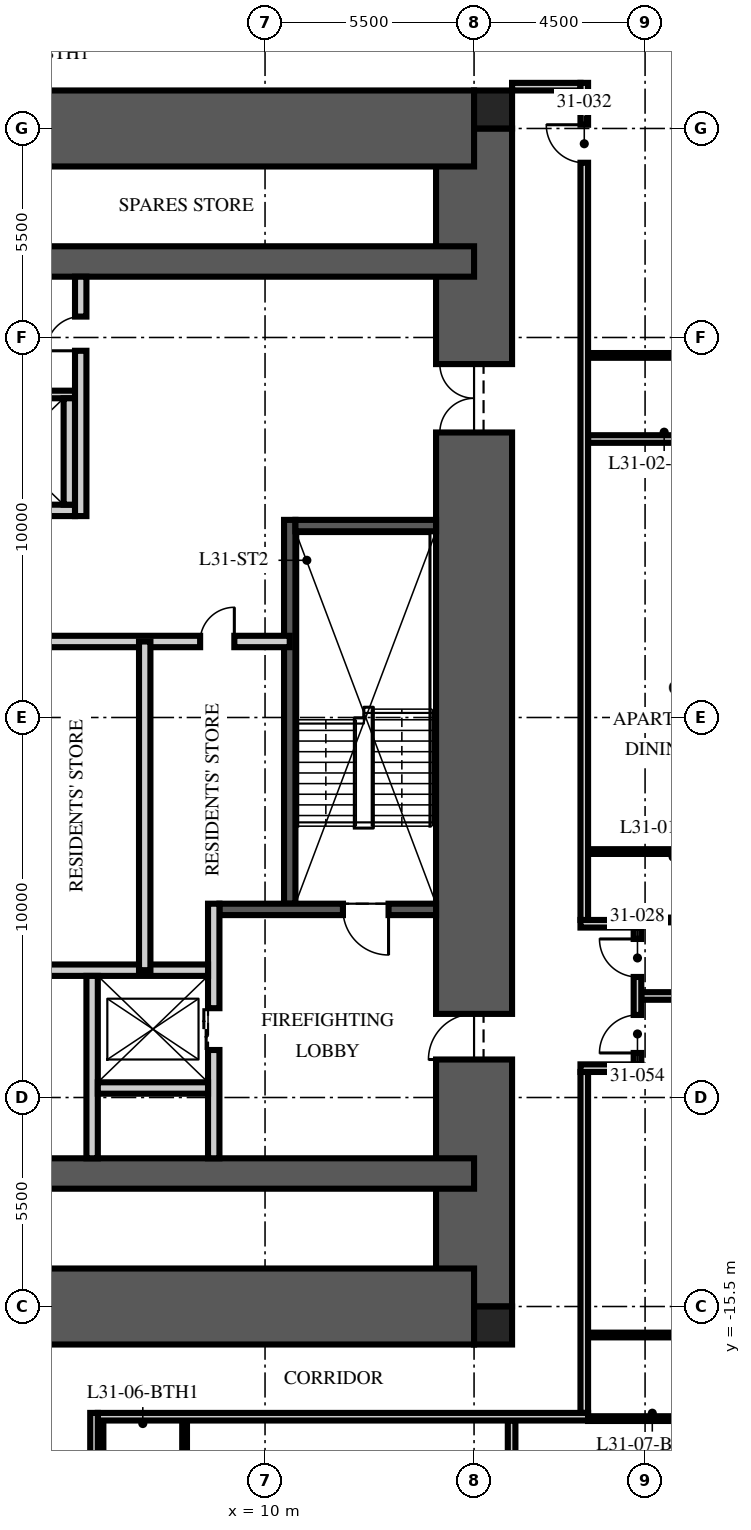
"""IFC4 building model, lengths in metres.
Left out: names, types, materials, properties, quantities, classifications, styles, units other than length and angle.
Written with IfcOpenShell. Run it as: python <this file> out.ifc"""

import sys

from ifc_helpers import new_model, si_unit, direction, frame, frame_2d, origin, origin_2d, place, context, subcontext, project, spatial, rectangle, extrude, element, fill, save


model = new_model("IFC4")
c1 = context("Model", 3, precision=1e-05, world=origin(), true_north=direction((0.0, 1.0)))
c2 = subcontext(c1, "Body", "Model", "MODEL_VIEW")
j1 = project(units=[si_unit("LENGTHUNIT", "METRE"), si_unit("PLANEANGLEUNIT", "RADIAN")], contexts=[c1])
p1 = place(None, origin())
s1 = spatial("IfcSite", under=j1, at=p1, CompositionType="ELEMENT")
p2 = place(p1, origin())
s2 = spatial("IfcBuilding", under=s1, at=p2, CompositionType="ELEMENT")
p3 = place(p2, frame((0.0, 0.0, 126.0)))
s3 = spatial("IfcBuildingStorey", under=s2, at=p3, CompositionType="ELEMENT", Elevation=126.0)
p4 = place(p3, frame((15.5, -15.5, -0.25), z_axis=(0.0, 0.0, 1.0), x_axis=(0.0, 1.0, 0.0)))
e1 = element("IfcWall", 1, at=p4, inside=s3, PredefinedType="SHEAR", context=c2, shape_type="SweptSolid", body=[
    extrude(rectangle(XDim=31.0, YDim=2.0, at=frame_2d((15.5, 0.0))), origin(), (0.0, 0.0, 1.0), 3.75),
])
p5 = place(p4, frame((6.5, 0.0, 0.25)))
e2 = element("IfcOpeningElement", 2, at=p5, cuts=e1, PredefinedType="OPENING", context=c2, shape_type="SweptSolid", body=[
    extrude(rectangle(XDim=1.2, YDim=2.1, at=frame_2d((0.6, 1.05))), frame((0.0, 1.01, 0.0), z_axis=(0.0, -1.0, 0.0), x_axis=(1.0, 0.0, 0.0)), (0.0, 0.0, 1.0), 2.02),
])
p6 = place(p4, frame((23.0, 0.0, 0.25)))
e3 = element("IfcOpeningElement", 3, at=p6, cuts=e1, PredefinedType="OPENING", context=c2, shape_type="SweptSolid", body=[
    extrude(rectangle(XDim=1.8, YDim=2.1, at=frame_2d((0.9, 1.05))), frame((0.0, 1.01, 0.0), z_axis=(0.0, -1.0, 0.0), x_axis=(1.0, 0.0, 0.0)), (0.0, 0.0, 1.0), 2.02),
])
p7 = place(p3, frame((-15.5, 15.5, -0.25), z_axis=(0.0, 0.0, 1.0), x_axis=(1.0, 0.0, 0.0)))
e4 = element("IfcWall", 4, at=p7, inside=s3, PredefinedType="SHEAR", context=c2, shape_type="SweptSolid", body=[
    extrude(rectangle(XDim=31.0, YDim=2.0, at=frame_2d((15.5, 0.0))), origin(), (0.0, 0.0, 1.0), 3.75),
])
p8 = place(p7, frame((5.0, 0.0, 0.25)))
e5 = element("IfcOpeningElement", 5, at=p8, cuts=e4, PredefinedType="OPENING", context=c2, shape_type="SweptSolid", body=[
    extrude(rectangle(XDim=1.0, YDim=2.1, at=frame_2d((0.5, 1.05))), frame((0.0, 1.01, 0.0), z_axis=(0.0, -1.0, 0.0), x_axis=(1.0, 0.0, 0.0)), (0.0, 0.0, 1.0), 2.02),
])
p9 = place(p3, frame((-15.5, -15.5, -0.25), z_axis=(0.0, 0.0, 1.0), x_axis=(1.0, 0.0, 0.0)))
e6 = element("IfcWall", 6, at=p9, inside=s3, PredefinedType="SHEAR", context=c2, shape_type="SweptSolid", body=[
    extrude(rectangle(XDim=31.0, YDim=2.0, at=frame_2d((15.5, 0.0))), origin(), (0.0, 0.0, 1.0), 3.75),
])
p10 = place(p9, frame((10.4, 0.0, 0.25)))
e7 = element("IfcOpeningElement", 7, at=p10, cuts=e6, PredefinedType="OPENING", context=c2, shape_type="SweptSolid", body=[
    extrude(rectangle(XDim=1.1, YDim=2.1, at=frame_2d((0.55, 1.05))), frame((0.0, 1.01, 0.0), z_axis=(0.0, -1.0, 0.0), x_axis=(1.0, 0.0, 0.0)), (0.0, 0.0, 1.0), 2.02),
])
p11 = place(p9, frame((13.5, 0.0, 0.25)))
e8 = element("IfcOpeningElement", 8, at=p11, cuts=e6, PredefinedType="OPENING", context=c2, shape_type="SweptSolid", body=[
    extrude(rectangle(XDim=1.1, YDim=2.1, at=frame_2d((0.55, 1.05))), frame((0.0, 1.01, 0.0), z_axis=(0.0, -1.0, 0.0), x_axis=(1.0, 0.0, 0.0)), (0.0, 0.0, 1.0), 2.02),
])
p12 = place(p9, frame((16.6, 0.0, 0.25)))
e9 = element("IfcOpeningElement", 9, at=p12, cuts=e6, PredefinedType="OPENING", context=c2, shape_type="SweptSolid", body=[
    extrude(rectangle(XDim=1.1, YDim=2.1, at=frame_2d((0.55, 1.05))), frame((0.0, 1.01, 0.0), z_axis=(0.0, -1.0, 0.0), x_axis=(1.0, 0.0, 0.0)), (0.0, 0.0, 1.0), 2.02),
])
for number, where, z_axis, x_axis in (
    (10, (-15.5, 12.0, -0.25), (0.0, 0.0, 1.0), (1.0, 0.0, 0.0)),
    (11, (-15.5, -12.0, -0.25), (0.0, 0.0, 1.0), (1.0, 0.0, 0.0)),
):
    element("IfcWall", number, at=place(p3, frame(where, z_axis=z_axis, x_axis=x_axis)), inside=s3, PredefinedType="SHEAR", context=c2, shape_type="SweptSolid", body=[
        extrude(rectangle(XDim=31.0, YDim=0.8, at=frame_2d((15.5, 0.0))), origin(), (0.0, 0.0, 1.0), 3.75),
    ])
for number, where, z_axis, x_axis in (
    (12, (16.0, 16.0, -0.25), (0.0, 0.0, 1.0), (1.0, 0.0, 0.0)),
    (13, (16.0, -16.0, -0.25), (0.0, 0.0, 1.0), (1.0, 0.0, 0.0)),
):
    element("IfcColumn", number, at=place(p3, frame(where, z_axis=z_axis, x_axis=x_axis)), inside=s3, PredefinedType="COLUMN", context=c2, shape_type="SweptSolid", body=[
        extrude(rectangle(XDim=1.0, YDim=1.0, at=origin_2d()), origin(), (0.0, 0.0, 1.0), 3.75),
    ])
p13 = place(p3, frame((10.65, -4.9, 0.0), z_axis=(0.0, 0.0, 1.0), x_axis=(0.0, 1.0, 0.0)))
e14 = element("IfcWall", 14, at=p13, inside=s3, PredefinedType="SOLIDWALL", context=c2, shape_type="SweptSolid", body=[
    extrude(rectangle(XDim=10.1, YDim=0.3, at=frame_2d((5.05, 0.0))), origin(), (0.0, 0.0, 1.0), 3.5),
])
p14 = place(p3, frame((14.5, -5.05, 0.0), z_axis=(0.0, 0.0, 1.0), x_axis=(-1.0, 0.0, 0.0)))
e15 = element("IfcWall", 15, at=p14, inside=s3, PredefinedType="SOLIDWALL", context=c2, shape_type="SweptSolid", body=[
    extrude(rectangle(XDim=5.7, YDim=0.3, at=frame_2d((2.85, 0.0))), origin(), (0.0, 0.0, 1.0), 3.5),
])
p15 = place(p14, frame((1.25, 0.0, 0.0)))
e16 = element("IfcOpeningElement", 16, at=p15, cuts=e15, PredefinedType="OPENING", context=c2, shape_type="SweptSolid", body=[
    extrude(rectangle(XDim=1.2, YDim=2.1, at=frame_2d((0.6, 1.05))), frame((0.0, 0.16, 0.0), z_axis=(0.0, -1.0, 0.0), x_axis=(1.0, 0.0, 0.0)), (0.0, 0.0, 1.0), 0.32),
])
p16 = place(p3, frame((14.5, 5.05, 0.0), z_axis=(0.0, 0.0, 1.0), x_axis=(-1.0, 0.0, 0.0)))
e17 = element("IfcWall", 17, at=p16, inside=s3, PredefinedType="SOLIDWALL", context=c2, shape_type="SweptSolid", body=[
    extrude(rectangle(XDim=3.7, YDim=0.3, at=frame_2d((1.85, 0.0))), origin(), (0.0, 0.0, 1.0), 3.5),
])
p17 = place(p3, frame((8.65, -11.6, 0.0), z_axis=(0.0, 0.0, 1.0), x_axis=(0.0, 1.0, 0.0)))
e18 = element("IfcWall", 18, at=p17, inside=s3, PredefinedType="PARTITIONING", context=c2, shape_type="SweptSolid", body=[
    extrude(rectangle(XDim=6.7, YDim=0.3, at=frame_2d((3.35, 0.0))), origin(), (0.0, 0.0, 1.0), 3.5),
])
p18 = place(p17, frame((2.85, 0.0, 0.0)))
e19 = element("IfcOpeningElement", 19, at=p18, cuts=e18, PredefinedType="OPENING", context=c2, shape_type="SweptSolid", body=[
    extrude(rectangle(XDim=1.1, YDim=2.1, at=frame_2d((0.55, 1.05))), frame((0.0, 0.16, 0.0), z_axis=(0.0, -1.0, 0.0), x_axis=(1.0, 0.0, 0.0)), (0.0, 0.0, 1.0), 0.32),
])
p19 = place(p3, frame((-8.5, -6.65, 0.0), z_axis=(0.0, 0.0, 1.0), x_axis=(1.0, 0.0, 0.0)))
e20 = element("IfcWall", 20, at=p19, inside=s3, PredefinedType="PARTITIONING", context=c2, shape_type="SweptSolid", body=[
    extrude(rectangle(XDim=17.0, YDim=0.3, at=frame_2d((8.5, 0.0))), origin(), (0.0, 0.0, 1.0), 3.5),
])
p20 = place(p19, frame((7.8, 0.0, 0.0)))
e21 = element("IfcOpeningElement", 21, at=p20, cuts=e20, PredefinedType="OPENING", context=c2, shape_type="SweptSolid", body=[
    extrude(rectangle(XDim=1.3, YDim=2.4, at=frame_2d((0.65, 1.2))), frame((0.0, 0.16, 0.0), z_axis=(0.0, -1.0, 0.0), x_axis=(1.0, 0.0, 0.0)), (0.0, 0.0, 1.0), 0.32),
])
p21 = place(p19, frame((5.65, 0.0, 0.0)))
e22 = element("IfcOpeningElement", 22, at=p21, cuts=e20, PredefinedType="OPENING", context=c2, shape_type="SweptSolid", body=[
    extrude(rectangle(XDim=0.9, YDim=2.1, at=frame_2d((0.45, 1.05))), frame((0.0, 0.16, 0.0), z_axis=(0.0, -1.0, 0.0), x_axis=(1.0, 0.0, 0.0)), (0.0, 0.0, 1.0), 0.32),
])
p22 = place(p19, frame((10.4, 0.0, 0.0)))
e23 = element("IfcOpeningElement", 23, at=p22, cuts=e20, PredefinedType="OPENING", context=c2, shape_type="SweptSolid", body=[
    extrude(rectangle(XDim=0.9, YDim=2.1, at=frame_2d((0.45, 1.05))), frame((0.0, 0.16, 0.0), z_axis=(0.0, -1.0, 0.0), x_axis=(1.0, 0.0, 0.0)), (0.0, 0.0, 1.0), 0.32),
])
p23 = place(p3, frame((5.45, -11.6, 0.0), z_axis=(0.0, 0.0, 1.0), x_axis=(0.0, 1.0, 0.0)))
e24 = element("IfcWall", 24, at=p23, inside=s3, PredefinedType="PARTITIONING", context=c2, shape_type="SweptSolid", body=[
    extrude(rectangle(XDim=4.8, YDim=0.3, at=frame_2d((2.4, 0.0))), origin(), (0.0, 0.0, 1.0), 3.5),
])
p24 = place(p3, frame((5.6, -9.75, 0.0), z_axis=(0.0, 0.0, 1.0), x_axis=(1.0, 0.0, 0.0)))
e25 = element("IfcWall", 25, at=p24, inside=s3, PredefinedType="PARTITIONING", context=c2, shape_type="SweptSolid", body=[
    extrude(rectangle(XDim=2.9, YDim=0.3, at=frame_2d((1.45, 0.0))), origin(), (0.0, 0.0, 1.0), 3.5),
])
p25 = place(p3, frame((-4.7, 5.45, 0.0), z_axis=(0.0, 0.0, 1.0), x_axis=(1.0, 0.0, 0.0)))
e26 = element("IfcWall", 26, at=p25, inside=s3, PredefinedType="PARTITIONING", context=c2, shape_type="SweptSolid", body=[
    extrude(rectangle(XDim=9.7, YDim=0.3, at=frame_2d((4.85, 0.0))), origin(), (0.0, 0.0, 1.0), 3.5),
])
p26 = place(p3, frame((-4.7, 8.5, 0.0), z_axis=(0.0, 0.0, 1.0), x_axis=(1.0, 0.0, 0.0)))
e27 = element("IfcWall", 27, at=p26, inside=s3, PredefinedType="PARTITIONING", context=c2, shape_type="SweptSolid", body=[
    extrude(rectangle(XDim=9.7, YDim=0.2, at=frame_2d((4.85, 0.0))), origin(), (0.0, 0.0, 1.0), 3.5),
])
p27 = place(p3, frame((4.85, 5.6, 0.0), z_axis=(0.0, 0.0, 1.0), x_axis=(0.0, 1.0, 0.0)))
e28 = element("IfcWall", 28, at=p27, inside=s3, PredefinedType="PARTITIONING", context=c2, shape_type="SweptSolid", body=[
    extrude(rectangle(XDim=2.8, YDim=0.3, at=frame_2d((1.4, 0.0))), origin(), (0.0, 0.0, 1.0), 3.5),
])
p28 = place(p3, frame((-10.65, 2.0, 0.0), z_axis=(0.0, 0.0, 1.0), x_axis=(1.0, 0.0, 0.0)))
e29 = element("IfcWall", 29, at=p28, inside=s3, PredefinedType="PARTITIONING", context=c2, shape_type="SweptSolid", body=[
    extrude(rectangle(XDim=21.3, YDim=0.3, at=frame_2d((10.65, 0.0))), origin(), (0.0, 0.0, 1.0), 3.5),
])
p29 = place(p28, frame((10.05, 0.0, 0.0)))
e30 = element("IfcOpeningElement", 30, at=p29, cuts=e29, PredefinedType="OPENING", context=c2, shape_type="SweptSolid", body=[
    extrude(rectangle(XDim=1.2, YDim=2.1, at=frame_2d((0.6, 1.05))), frame((0.0, 0.16, 0.0), z_axis=(0.0, -1.0, 0.0), x_axis=(1.0, 0.0, 0.0)), (0.0, 0.0, 1.0), 0.32),
])
p30 = place(p28, frame((18.942, 0.0, 0.0)))
e31 = element("IfcOpeningElement", 31, at=p30, cuts=e29, PredefinedType="OPENING", context=c2, shape_type="SweptSolid", body=[
    extrude(rectangle(XDim=0.9, YDim=2.1, at=frame_2d((0.45, 1.05))), frame((0.0, 0.16, 0.0), z_axis=(0.0, -1.0, 0.0), x_axis=(1.0, 0.0, 0.0)), (0.0, 0.0, 1.0), 0.32),
])
p31 = place(p3, frame((6.834, -6.65, 0.0), z_axis=(0.0, 0.0, 1.0), x_axis=(0.0, 1.0, 0.0)))
e32 = element("IfcWall", 32, at=p31, inside=s3, PredefinedType="PARTITIONING", context=c2, shape_type="SweptSolid", body=[
    extrude(rectangle(XDim=8.65, YDim=0.3, at=frame_2d((4.325, 0.0))), origin(), (0.0, 0.0, 1.0), 3.5),
])
p32 = place(p3, frame((5.15, 5.3, 0.0), z_axis=(0.0, 0.0, 1.0), x_axis=(0.0, 1.0, 0.0)))
e33 = element("IfcWall", 33, at=p32, inside=s3, PredefinedType="PARTITIONING", context=c2, shape_type="SweptSolid", body=[
    extrude(rectangle(XDim=6.3, YDim=0.3, at=frame_2d((3.15, 0.0))), origin(), (0.0, 0.0, 1.0), 3.5),
])
p33 = place(p32, frame((4.35, 0.0, 0.0)))
e34 = element("IfcOpeningElement", 34, at=p33, cuts=e33, PredefinedType="OPENING", context=c2, shape_type="SweptSolid", body=[
    extrude(rectangle(XDim=0.9, YDim=2.1, at=frame_2d((0.45, 1.05))), frame((0.0, 0.16, 0.0), z_axis=(0.0, -1.0, 0.0), x_axis=(1.0, 0.0, 0.0)), (0.0, 0.0, 1.0), 0.32),
])
p34 = place(p3, frame((16.5, 16.6, 0.0), z_axis=(0.0, 0.0, 1.0), x_axis=(1.0, 0.0, 0.0)))
e35 = element("IfcWall", 35, at=p34, inside=s3, PredefinedType="PARTITIONING", context=c2, shape_type="SweptSolid", body=[
    extrude(rectangle(XDim=1.8, YDim=0.2, at=frame_2d((0.9, 0.0))), origin(), (0.0, 0.0, 1.0), 2.3),
])
p35 = place(p3, frame((19.9, -7.328, 0.0), z_axis=(0.0, 0.0, 1.0), x_axis=(1.0, 0.0, 0.0)))
e36 = element("IfcWall", 36, at=p35, inside=s3, PredefinedType="PARTITIONING", context=c2, shape_type="SweptSolid", body=[
    extrude(rectangle(XDim=9.0, YDim=0.2, at=frame_2d((4.5, 0.0))), origin(), (0.0, 0.0, 1.0), 2.81),
])
for number, where, z_axis, x_axis in (
    (37, (18.5, 7.328, 0.0), (0.0, 0.0, 1.0), (1.0, 0.0, 0.0)),
    (38, (16.488, -18.5, 0.0), (0.0, 0.0, 1.0), (0.0, -1.0, 0.0)),
):
    element("IfcWall", number, at=place(p3, frame(where, z_axis=z_axis, x_axis=x_axis)), inside=s3, PredefinedType="PARTITIONING", context=c2, shape_type="SweptSolid", body=[
        extrude(rectangle(XDim=10.4, YDim=0.2, at=frame_2d((5.2, 0.0))), origin(), (0.0, 0.0, 1.0), 2.81),
    ])
p36 = place(p3, frame((19.97, -5.328, 0.0), z_axis=(0.0, 0.0, 1.0), x_axis=(1.0, 0.0, 0.0)))
e39 = element("IfcWall", 39, at=p36, inside=s3, PredefinedType="PARTITIONING", context=c2, shape_type="SweptSolid", body=[
    extrude(rectangle(XDim=2.81, YDim=0.125, at=frame_2d((1.405, 0.0))), origin(), (0.0, 0.0, 1.0), 3.5),
])
for number, where, z_axis, x_axis in (
    (40, (18.5, -3.528, 0.0), (0.0, 0.0, 1.0), (1.0, 0.0, 0.0)),
    (41, (18.5, 9.528, 0.0), (0.0, 0.0, 1.0), (1.0, 0.0, 0.0)),
    (42, (5.684, -18.5, 0.0), (0.0, 0.0, 1.0), (0.0, -1.0, 0.0)),
    (43, (7.884, -18.5, 0.0), (0.0, 0.0, 1.0), (0.0, -1.0, 0.0)),
):
    element("IfcWall", number, at=place(p3, frame(where, z_axis=z_axis, x_axis=x_axis)), inside=s3, PredefinedType="PARTITIONING", context=c2, shape_type="SweptSolid", body=[
        extrude(rectangle(XDim=4.28, YDim=0.125, at=frame_2d((2.14, 0.0))), origin(), (0.0, 0.0, 1.0), 3.5),
    ])
p37 = place(p3, frame((18.5, -18.45, 0.0), z_axis=(0.0, 0.0, 1.0), x_axis=(1.0, 0.0, 0.0)))
e44 = element("IfcWall", 44, at=p37, inside=s3, PredefinedType="PARTITIONING", context=c2, shape_type="SweptSolid", body=[
    extrude(rectangle(XDim=4.28, YDim=0.125, at=frame_2d((2.14, 0.0))), origin(), (0.0, 0.0, 1.0), 2.3),
])
p38 = place(p3, frame((18.5, -16.25, 0.0), z_axis=(0.0, 0.0, 1.0), x_axis=(1.0, 0.0, 0.0)))
e45 = element("IfcWall", 45, at=p38, inside=s3, PredefinedType="PARTITIONING", context=c2, shape_type="SweptSolid", body=[
    extrude(rectangle(XDim=4.28, YDim=0.125, at=frame_2d((2.14, 0.0))), origin(), (0.0, 0.0, 1.0), 3.5),
])
p39 = place(p3, frame((18.4, -18.3, 0.0), z_axis=(0.0, 0.0, 1.0), x_axis=(0.0, 1.0, 0.0)))
e46 = element("IfcWall", 46, at=p39, inside=s3, PredefinedType="PARTITIONING", context=c2, shape_type="SweptSolid", body=[
    extrude(rectangle(XDim=8.972, YDim=0.2, at=frame_2d((4.486, 0.0))), origin(), (0.0, 0.0, 1.0), 2.3),
])
p40 = place(p3, frame((18.3, -9.228, 0.0), z_axis=(0.0, 0.0, 1.0), x_axis=(1.0, 0.0, 0.0)))
e47 = element("IfcWall", 47, at=p40, inside=s3, PredefinedType="PARTITIONING", context=c2, shape_type="SweptSolid", body=[
    extrude(rectangle(XDim=1.6, YDim=0.2, at=frame_2d((0.8, 0.0))), origin(), (0.0, 0.0, 1.0), 2.7),
])
p41 = place(p3, frame((18.3, -5.428, 0.0), z_axis=(0.0, 0.0, 1.0), x_axis=(1.0, 0.0, 0.0)))
e48 = element("IfcWall", 48, at=p41, inside=s3, PredefinedType="PARTITIONING", context=c2, shape_type="SweptSolid", body=[
    extrude(rectangle(XDim=1.6, YDim=0.2, at=frame_2d((0.8, 0.0))), origin(), (0.0, 0.0, 1.0), 3.5),
])
p42 = place(p3, frame((19.8, -9.128, 0.0), z_axis=(0.0, 0.0, 1.0), x_axis=(0.0, 1.0, 0.0)))
e49 = element("IfcWall", 49, at=p42, inside=s3, PredefinedType="PARTITIONING", context=c2, shape_type="SweptSolid", body=[
    extrude(rectangle(XDim=3.6, YDim=0.2, at=frame_2d((1.8, 0.0))), origin(), (0.0, 0.0, 1.0), 2.7),
])
p43 = place(p42, frame((2.3, 0.0, 0.0)))
e50 = element("IfcOpeningElement", 50, at=p43, cuts=e49, PredefinedType="OPENING", context=c2, shape_type="SweptSolid", body=[
    extrude(rectangle(XDim=1.0, YDim=2.2, at=frame_2d((0.5, 1.1))), frame((0.0, 0.11, 0.0), z_axis=(0.0, -1.0, 0.0), x_axis=(1.0, 0.0, 0.0)), (0.0, 0.0, 1.0), 0.22),
])
p44 = place(p42, frame((0.3, 0.0, 0.0)))
e51 = element("IfcOpeningElement", 51, at=p44, cuts=e49, PredefinedType="OPENING", context=c2, shape_type="SweptSolid", body=[
    extrude(rectangle(XDim=1.0, YDim=2.2, at=frame_2d((0.5, 1.1))), frame((0.0, 0.11, 0.0), z_axis=(0.0, -1.0, 0.0), x_axis=(1.0, 0.0, 0.0)), (0.0, 0.0, 1.0), 0.22),
])
p45 = place(p3, frame((18.4, -5.328, 0.0), z_axis=(0.0, 0.0, 1.0), x_axis=(0.0, 1.0, 0.0)))
e52 = element("IfcWall", 52, at=p45, inside=s3, PredefinedType="PARTITIONING", context=c2, shape_type="SweptSolid", body=[
    extrude(rectangle(XDim=22.028, YDim=0.2, at=frame_2d((11.014, 0.0))), origin(), (0.0, 0.0, 1.0), 2.7),
])
p46 = place(p45, frame((19.926, 0.0, 0.0)))
e53 = element("IfcOpeningElement", 53, at=p46, cuts=e52, PredefinedType="OPENING", context=c2, shape_type="SweptSolid", body=[
    extrude(rectangle(XDim=1.0, YDim=2.2, at=frame_2d((0.5, 1.1))), frame((0.0, 0.11, 0.0), z_axis=(0.0, -1.0, 0.0), x_axis=(1.0, 0.0, 0.0)), (0.0, 0.0, 1.0), 0.22),
])
p47 = place(p3, frame((18.5, -18.4, 0.0), z_axis=(0.0, 0.0, 1.0), x_axis=(-1.0, 0.0, 0.0)))
e54 = element("IfcWall", 54, at=p47, inside=s3, PredefinedType="PARTITIONING", context=c2, shape_type="SweptSolid", body=[
    extrude(rectangle(XDim=12.9, YDim=0.2, at=frame_2d((6.45, 0.0))), origin(), (0.0, 0.0, 1.0), 2.3),
])
p48 = place(p3, frame((5.5, -18.3, 0.0), z_axis=(0.0, 0.0, 1.0), x_axis=(0.0, -1.0, 0.0)))
e55 = element("IfcWall", 55, at=p48, inside=s3, PredefinedType="PARTITIONING", context=c2, shape_type="SweptSolid", body=[
    extrude(rectangle(XDim=3.0, YDim=0.2, at=frame_2d((1.5, 0.0))), origin(), (0.0, 0.0, 1.0), 3.5),
])
p49 = place(p15, origin())
e56 = element("IfcDoor", 56, at=p49, inside=s3, OperationType="SINGLE_SWING_LEFT", PredefinedType="DOOR", context=c2, shape_type="SweptSolid", body=[
    extrude(rectangle(XDim=1.2, YDim=2.1, at=frame_2d((0.6, 1.05))), frame((0.0, 0.025, 0.0), z_axis=(0.0, -1.0, 0.0), x_axis=(1.0, 0.0, 0.0)), (0.0, 0.0, 1.0), 0.05),
])
fill(e16, e56)
p50 = place(p5, origin())
e57 = element("IfcDoor", 57, at=p50, inside=s3, OperationType="SINGLE_SWING_LEFT", PredefinedType="DOOR", context=c2, shape_type="SweptSolid", body=[
    extrude(rectangle(XDim=1.2, YDim=2.1, at=frame_2d((0.6, 1.05))), frame((0.0, 0.025, 0.0), z_axis=(0.0, -1.0, 0.0), x_axis=(1.0, 0.0, 0.0)), (0.0, 0.0, 1.0), 0.05),
])
fill(e2, e57)
p51 = place(p6, origin())
e58 = element("IfcDoor", 58, at=p51, inside=s3, OperationType="DOUBLE_DOOR_SINGLE_SWING", PredefinedType="DOOR", context=c2, shape_type="SweptSolid", body=[
    extrude(rectangle(XDim=1.8, YDim=2.1, at=frame_2d((0.9, 1.05))), frame((0.0, 0.025, 0.0), z_axis=(0.0, -1.0, 0.0), x_axis=(1.0, 0.0, 0.0)), (0.0, 0.0, 1.0), 0.05),
])
fill(e3, e58)
p52 = place(p18, origin())
e59 = element("IfcDoor", 59, at=p52, inside=s3, OperationType="DOUBLE_DOOR_SLIDING", PredefinedType="DOOR", context=c2, shape_type="SweptSolid", body=[
    extrude(rectangle(XDim=1.1, YDim=2.1, at=frame_2d((0.55, 1.05))), frame((0.0, 0.025, 0.0), z_axis=(0.0, -1.0, 0.0), x_axis=(1.0, 0.0, 0.0)), (0.0, 0.0, 1.0), 0.05),
])
fill(e19, e59)
p53 = place(p30, origin())
e60 = element("IfcDoor", 60, at=p53, inside=s3, OperationType="SINGLE_SWING_RIGHT", PredefinedType="DOOR", context=c2, shape_type="SweptSolid", body=[
    extrude(rectangle(XDim=0.9, YDim=2.1, at=frame_2d((0.45, 1.05))), frame((0.0, 0.025, 0.0), z_axis=(0.0, -1.0, 0.0), x_axis=(1.0, 0.0, 0.0)), (0.0, 0.0, 1.0), 0.05),
])
fill(e31, e60)
p54 = place(p33, origin())
e61 = element("IfcDoor", 61, at=p54, inside=s3, OperationType="SINGLE_SWING_LEFT", PredefinedType="DOOR", context=c2, shape_type="SweptSolid", body=[
    extrude(rectangle(XDim=0.9, YDim=2.1, at=frame_2d((0.45, 1.05))), frame((0.0, 0.025, 0.0), z_axis=(0.0, -1.0, 0.0), x_axis=(1.0, 0.0, 0.0)), (0.0, 0.0, 1.0), 0.05),
])
fill(e34, e61)
p55 = place(p43, origin())
e62 = element("IfcDoor", 62, at=p55, inside=s3, OperationType="SINGLE_SWING_RIGHT", PredefinedType="DOOR", context=c2, shape_type="SweptSolid", body=[
    extrude(rectangle(XDim=1.0, YDim=2.2, at=frame_2d((0.5, 1.1))), frame((0.0, 0.025, 0.0), z_axis=(0.0, -1.0, 0.0), x_axis=(1.0, 0.0, 0.0)), (0.0, 0.0, 1.0), 0.05),
])
fill(e50, e62)
p56 = place(p46, origin())
e63 = element("IfcDoor", 63, at=p56, inside=s3, OperationType="SINGLE_SWING_RIGHT", PredefinedType="DOOR", context=c2, shape_type="SweptSolid", body=[
    extrude(rectangle(XDim=1.0, YDim=2.2, at=frame_2d((0.5, 1.1))), frame((0.0, 0.025, 0.0), z_axis=(0.0, -1.0, 0.0), x_axis=(1.0, 0.0, 0.0)), (0.0, 0.0, 1.0), 0.05),
])
fill(e53, e63)
p57 = place(p44, origin())
e64 = element("IfcDoor", 64, at=p57, inside=s3, OperationType="SINGLE_SWING_LEFT", PredefinedType="DOOR", context=c2, shape_type="SweptSolid", body=[
    extrude(rectangle(XDim=1.0, YDim=2.2, at=frame_2d((0.5, 1.1))), frame((0.0, 0.025, 0.0), z_axis=(0.0, -1.0, 0.0), x_axis=(1.0, 0.0, 0.0)), (0.0, 0.0, 1.0), 0.05),
])
fill(e51, e64)
save(model, sys.argv[1])
